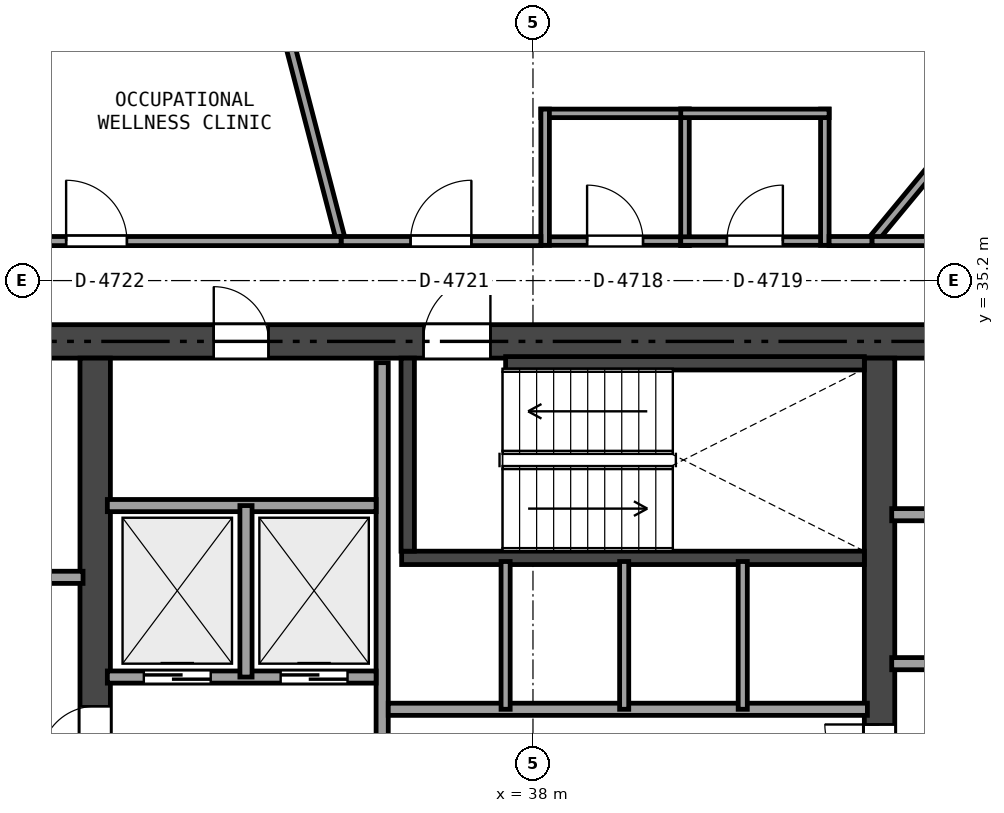
"""IFC4 building model, lengths in metres.
Left out: names, types, materials, properties, quantities, classifications, styles, units other than length and angle.
Written with IfcOpenShell. Run it as: python <this file> out.ifc"""

import sys

from ifc_helpers import new_model, si_unit, direction, frame, frame_2d, origin, place, context, subcontext, project, spatial, rectangle, extrude, element, fill, save


model = new_model("IFC4")
c1 = context("Model", 3, precision=1e-05, world=origin(), true_north=direction((0.0, 1.0)))
c2 = subcontext(c1, "Body", "Model", "MODEL_VIEW")
j1 = project(units=[si_unit("LENGTHUNIT", "METRE"), si_unit("PLANEANGLEUNIT", "RADIAN")], contexts=[c1])
p1 = place(None, origin())
s1 = spatial("IfcSite", under=j1, at=p1, CompositionType="ELEMENT")
p2 = place(p1, origin())
s2 = spatial("IfcBuilding", under=s1, at=p2, CompositionType="ELEMENT")
p3 = place(p2, frame((0.0, 0.0, 177.0)))
s3 = spatial("IfcBuildingStorey", under=s2, at=p3, CompositionType="ELEMENT", Elevation=177.0)
p4 = place(p3, frame((26.525, 34.2, 0.0), z_axis=(0.0, 0.0, 1.0), x_axis=(1.0, 0.0, 0.0)))
e1 = element("IfcWall", 1, at=p4, inside=s3, PredefinedType="SHEAR", context=c2, shape_type="SweptSolid", body=[
    extrude(rectangle(XDim=21.35, YDim=0.55, at=frame_2d((10.675, 0.0))), origin(), (0.0, 0.0, 1.0), 3.32),
])
p5 = place(p4, frame((9.675, 0.0, 0.0)))
e2 = element("IfcOpeningElement", 2, at=p5, cuts=e1, PredefinedType="OPENING", context=c2, shape_type="SweptSolid", body=[
    extrude(rectangle(XDim=1.1, YDim=2.15, at=frame_2d((0.55, 1.075))), frame((0.0, 0.285, 0.0), z_axis=(0.0, -1.0, 0.0), x_axis=(1.0, 0.0, 0.0)), (0.0, 0.0, 1.0), 0.57),
])
p6 = place(p4, frame((1.925, 0.0, 0.0)))
e3 = element("IfcOpeningElement", 3, at=p6, cuts=e1, PredefinedType="OPENING", context=c2, shape_type="SweptSolid", body=[
    extrude(rectangle(XDim=0.9, YDim=2.1, at=frame_2d((0.45, 1.05))), frame((0.0, 0.285, 0.0), z_axis=(0.0, -1.0, 0.0), x_axis=(1.0, 0.0, 0.0)), (0.0, 0.0, 1.0), 0.57),
])
p7 = place(p4, frame((6.225, 0.0, 0.0)))
e4 = element("IfcOpeningElement", 4, at=p7, cuts=e1, PredefinedType="OPENING", context=c2, shape_type="SweptSolid", body=[
    extrude(rectangle(XDim=0.9, YDim=2.1, at=frame_2d((0.45, 1.05))), frame((0.0, 0.285, 0.0), z_axis=(0.0, -1.0, 0.0), x_axis=(1.0, 0.0, 0.0)), (0.0, 0.0, 1.0), 0.57),
])
p8 = place(p3, frame((30.8, 18.875, 0.0), z_axis=(0.0, 0.0, 1.0), x_axis=(0.0, 1.0, 0.0)))
e5 = element("IfcWall", 5, at=p8, inside=s3, PredefinedType="SHEAR", context=c2, shape_type="SweptSolid", body=[
    extrude(rectangle(XDim=15.05, YDim=0.5, at=frame_2d((7.525, 0.0))), origin(), (0.0, 0.0, 1.0), 3.32),
])
p9 = place(p8, frame((6.625, 0.0, 0.0)))
e6 = element("IfcOpeningElement", 6, at=p9, cuts=e5, PredefinedType="OPENING", context=c2, shape_type="SweptSolid", body=[
    extrude(rectangle(XDim=1.1, YDim=2.15, at=frame_2d((0.55, 1.075))), frame((0.0, 0.26, 0.0), z_axis=(0.0, -1.0, 0.0), x_axis=(1.0, 0.0, 0.0)), (0.0, 0.0, 1.0), 0.52),
])
p10 = place(p8, frame((8.425, 0.0, 0.0)))
e7 = element("IfcOpeningElement", 7, at=p10, cuts=e5, PredefinedType="OPENING", context=c2, shape_type="SweptSolid", body=[
    extrude(rectangle(XDim=0.9, YDim=2.1, at=frame_2d((0.45, 1.05))), frame((0.0, 0.26, 0.0), z_axis=(0.0, -1.0, 0.0), x_axis=(1.0, 0.0, 0.0)), (0.0, 0.0, 1.0), 0.52),
])
p11 = place(p3, frame((43.7, 18.875, 0.0), z_axis=(0.0, 0.0, 1.0), x_axis=(0.0, 1.0, 0.0)))
e8 = element("IfcWall", 8, at=p11, inside=s3, PredefinedType="SHEAR", context=c2, shape_type="SweptSolid", body=[
    extrude(rectangle(XDim=15.05, YDim=0.5, at=frame_2d((7.525, 0.0))), origin(), (0.0, 0.0, 1.0), 3.32),
])
p12 = place(p11, frame((8.125, 0.0, 0.0)))
e9 = element("IfcOpeningElement", 9, at=p12, cuts=e8, PredefinedType="OPENING", context=c2, shape_type="SweptSolid", body=[
    extrude(rectangle(XDim=0.9, YDim=2.1, at=frame_2d((0.45, 1.05))), frame((0.0, 0.26, 0.0), z_axis=(0.0, -1.0, 0.0), x_axis=(1.0, 0.0, 0.0)), (0.0, 0.0, 1.0), 0.52),
])
p13 = place(p3, frame((35.84, 30.64, 0.0), z_axis=(0.0, 0.0, 1.0), x_axis=(1.0, 0.0, 0.0)))
e10 = element("IfcWall", 10, at=p13, inside=s3, PredefinedType="SHEAR", context=c2, shape_type="SweptSolid", body=[
    extrude(rectangle(XDim=7.61, YDim=0.22, at=frame_2d((3.805, 0.0))), origin(), (0.0, 0.0, 1.0), 3.32),
])
p14 = place(p3, frame((35.94, 30.75, 0.0), z_axis=(0.0, 0.0, 1.0), x_axis=(0.0, 1.0, 0.0)))
e11 = element("IfcWall", 11, at=p14, inside=s3, PredefinedType="SHEAR", context=c2, shape_type="SweptSolid", body=[
    extrude(rectangle(XDim=3.175, YDim=0.22, at=frame_2d((1.587, 0.0))), origin(), (0.0, 0.0, 1.0), 3.32),
])
p15 = place(p3, frame((37.55, 33.84, 0.0), z_axis=(0.0, 0.0, 1.0), x_axis=(1.0, 0.0, 0.0)))
e12 = element("IfcWall", 12, at=p15, inside=s3, PredefinedType="SHEAR", context=c2, shape_type="SweptSolid", body=[
    extrude(rectangle(XDim=5.9, YDim=0.22, at=frame_2d((2.95, 0.0))), origin(), (0.0, 0.0, 1.0), 3.32),
])
p16 = place(p3, frame((27.15, 30.32, 0.0), z_axis=(0.0, 0.0, 1.0), x_axis=(1.0, 0.0, 0.0)))
e13 = element("IfcWall", 13, at=p16, inside=s3, PredefinedType="SOLIDWALL", context=c2, shape_type="SweptSolid", body=[
    extrude(rectangle(XDim=3.45, YDim=0.2, at=frame_2d((1.725, 0.0))), origin(), (0.0, 0.0, 1.0), 3.32),
])
p17 = place(p3, frame((43.9, 28.9, 0.0), z_axis=(0.0, 0.0, 1.0), x_axis=(1.0, 0.0, 0.0)))
e14 = element("IfcWall", 14, at=p17, inside=s3, PredefinedType="SOLIDWALL", context=c2, shape_type="SweptSolid", body=[
    extrude(rectangle(XDim=3.35, YDim=0.2, at=frame_2d((1.675, 0.0))), origin(), (0.0, 0.0, 1.0), 3.32),
])
p18 = place(p17, frame((1.15, 0.0, 0.0)))
e15 = element("IfcOpeningElement", 15, at=p18, cuts=e14, PredefinedType="OPENING", context=c2, shape_type="SweptSolid", body=[
    extrude(rectangle(XDim=0.9, YDim=2.1, at=frame_2d((0.45, 1.05))), frame((0.0, 0.11, 0.0), z_axis=(0.0, -1.0, 0.0), x_axis=(1.0, 0.0, 0.0)), (0.0, 0.0, 1.0), 0.22),
])
p19 = place(p3, frame((43.9, 31.35, 0.0), z_axis=(0.0, 0.0, 1.0), x_axis=(1.0, 0.0, 0.0)))
e16 = element("IfcWall", 16, at=p19, inside=s3, PredefinedType="SOLIDWALL", context=c2, shape_type="SweptSolid", body=[
    extrude(rectangle(XDim=3.35, YDim=0.2, at=frame_2d((1.675, 0.0))), origin(), (0.0, 0.0, 1.0), 3.32),
])
p20 = place(p3, frame((35.52, 18.95, 0.0), z_axis=(0.0, 0.0, 1.0), x_axis=(0.0, 1.0, 0.0)))
e17 = element("IfcWall", 17, at=p20, inside=s3, PredefinedType="SOLIDWALL", context=c2, shape_type="SweptSolid", body=[
    extrude(rectangle(XDim=14.9, YDim=0.2, at=frame_2d((7.45, 0.0))), origin(), (0.0, 0.0, 1.0), 2.841),
])
p21 = place(p20, frame((7.755, 0.0, 0.0)))
e18 = element("IfcOpeningElement", 18, at=p21, cuts=e17, PredefinedType="OPENING", context=c2, shape_type="SweptSolid", body=[
    extrude(rectangle(XDim=0.95, YDim=2.15, at=frame_2d((0.475, 1.075))), frame((0.0, 0.11, 0.0), z_axis=(0.0, -1.0, 0.0), x_axis=(1.0, 0.0, 0.0)), (0.0, 0.0, 1.0), 0.22),
])
p22 = place(p20, frame((0.6, 0.0, 0.0)))
e19 = element("IfcOpeningElement", 19, at=p22, cuts=e17, PredefinedType="OPENING", context=c2, shape_type="SweptSolid", body=[
    extrude(rectangle(XDim=0.9, YDim=2.1, at=frame_2d((0.45, 1.05))), frame((0.0, 0.11, 0.0), z_axis=(0.0, -1.0, 0.0), x_axis=(1.0, 0.0, 0.0)), (0.0, 0.0, 1.0), 0.22),
])
p23 = place(p3, frame((31.0, 28.68, 0.0), z_axis=(0.0, 0.0, 1.0), x_axis=(1.0, 0.0, 0.0)))
e20 = element("IfcWall", 20, at=p23, inside=s3, PredefinedType="SOLIDWALL", context=c2, shape_type="SweptSolid", body=[
    extrude(rectangle(XDim=4.42, YDim=0.2, at=frame_2d((2.21, 0.0))), origin(), (0.0, 0.0, 1.0), 3.32),
])
p24 = place(p23, frame((0.6, 0.0, 0.0)))
e21 = element("IfcOpeningElement", 21, at=p24, cuts=e20, PredefinedType="OPENING", context=c2, shape_type="SweptSolid", body=[
    extrude(rectangle(XDim=1.1, YDim=2.15, at=frame_2d((0.55, 1.075))), frame((0.0, 0.11, 0.0), z_axis=(0.0, -1.0, 0.0), x_axis=(1.0, 0.0, 0.0)), (0.0, 0.0, 1.0), 0.22),
])
p25 = place(p23, frame((2.85, 0.0, 0.0)))
e22 = element("IfcOpeningElement", 22, at=p25, cuts=e20, PredefinedType="OPENING", context=c2, shape_type="SweptSolid", body=[
    extrude(rectangle(XDim=1.1, YDim=2.15, at=frame_2d((0.55, 1.075))), frame((0.0, 0.11, 0.0), z_axis=(0.0, -1.0, 0.0), x_axis=(1.0, 0.0, 0.0)), (0.0, 0.0, 1.0), 0.22),
])
p26 = place(p3, frame((31.0, 31.5, 0.0), z_axis=(0.0, 0.0, 1.0), x_axis=(1.0, 0.0, 0.0)))
e23 = element("IfcWall", 23, at=p26, inside=s3, PredefinedType="SOLIDWALL", context=c2, shape_type="SweptSolid", body=[
    extrude(rectangle(XDim=4.42, YDim=0.2, at=frame_2d((2.21, 0.0))), origin(), (0.0, 0.0, 1.0), 3.32),
])
p27 = place(p3, frame((33.28, 28.68, 0.0), z_axis=(0.0, 0.0, 1.0), x_axis=(0.0, 1.0, 0.0)))
e24 = element("IfcWall", 24, at=p27, inside=s3, PredefinedType="SOLIDWALL", context=c2, shape_type="SweptSolid", body=[
    extrude(rectangle(XDim=2.82, YDim=0.2, at=frame_2d((1.41, 0.0))), origin(), (0.0, 0.0, 1.0), 3.32),
])
p28 = place(p3, frame((35.62, 28.15, 0.0), z_axis=(0.0, 0.0, 1.0), x_axis=(1.0, 0.0, 0.0)))
e25 = element("IfcWall", 25, at=p28, inside=s3, PredefinedType="SOLIDWALL", context=c2, shape_type="SweptSolid", body=[
    extrude(rectangle(XDim=7.88, YDim=0.2, at=frame_2d((3.94, 0.0))), origin(), (0.0, 0.0, 1.0), 3.32),
])
for number, where, z_axis, x_axis in (
    (26, (37.55, 28.15, 0.0), (0.0, 0.0, 1.0), (0.0, 1.0, 0.0)),
    (27, (39.5, 28.15, 0.0), (0.0, 0.0, 1.0), (0.0, 1.0, 0.0)),
    (28, (41.45, 28.15, 0.0), (0.0, 0.0, 1.0), (0.0, 1.0, 0.0)),
):
    element("IfcWall", number, at=place(p3, frame(where, z_axis=z_axis, x_axis=x_axis)), inside=s3, PredefinedType="PARTITIONING", context=c2, shape_type="SweptSolid", body=[
        extrude(rectangle(XDim=2.43, YDim=0.15, at=frame_2d((1.215, 0.0))), origin(), (0.0, 0.0, 1.0), 3.32),
    ])
p29 = place(p3, frame((38.13, 35.85, 0.0), z_axis=(0.0, 0.0, 1.0), x_axis=(1.0, 0.0, 0.0)))
e29 = element("IfcWall", 29, at=p29, inside=s3, PredefinedType="PARTITIONING", context=c2, shape_type="SweptSolid", body=[
    extrude(rectangle(XDim=2.44, YDim=0.14, at=frame_2d((1.22, 0.0))), origin(), (0.0, 0.0, 1.0), 2.841),
])
p30 = place(p29, frame((0.76, 0.0, 0.0)))
e30 = element("IfcOpeningElement", 30, at=p30, cuts=e29, PredefinedType="OPENING", context=c2, shape_type="SweptSolid", body=[
    extrude(rectangle(XDim=0.92, YDim=2.1, at=frame_2d((0.46, 1.05))), frame((0.0, 0.08, 0.0), z_axis=(0.0, -1.0, 0.0), x_axis=(1.0, 0.0, 0.0)), (0.0, 0.0, 1.0), 0.16),
])
p31 = place(p3, frame((40.5, 35.78, 0.0), z_axis=(0.0, 0.0, 1.0), x_axis=(0.0, 1.0, 0.0)))
e31 = element("IfcWall", 31, at=p31, inside=s3, PredefinedType="PARTITIONING", context=c2, shape_type="SweptSolid", body=[
    extrude(rectangle(XDim=2.24, YDim=0.14, at=frame_2d((1.12, 0.0))), origin(), (0.0, 0.0, 1.0), 2.993),
])
p32 = place(p3, frame((40.57, 37.95, 0.0), z_axis=(0.0, 0.0, 1.0), x_axis=(-1.0, 0.0, 0.0)))
e32 = element("IfcWall", 32, at=p32, inside=s3, PredefinedType="PARTITIONING", context=c2, shape_type="SweptSolid", body=[
    extrude(rectangle(XDim=2.44, YDim=0.14, at=frame_2d((1.22, 0.0))), origin(), (0.0, 0.0, 1.0), 2.841),
])
p33 = place(p3, frame((38.2, 38.02, 0.0), z_axis=(0.0, 0.0, 1.0), x_axis=(0.0, -1.0, 0.0)))
e33 = element("IfcWall", 33, at=p33, inside=s3, PredefinedType="PARTITIONING", context=c2, shape_type="SweptSolid", body=[
    extrude(rectangle(XDim=2.24, YDim=0.14, at=frame_2d((1.12, 0.0))), origin(), (0.0, 0.0, 1.0), 2.993),
])
p34 = place(p3, frame((40.43, 35.85, 0.0), z_axis=(0.0, 0.0, 1.0), x_axis=(1.0, 0.0, 0.0)))
e34 = element("IfcWall", 34, at=p34, inside=s3, PredefinedType="PARTITIONING", context=c2, shape_type="SweptSolid", body=[
    extrude(rectangle(XDim=2.44, YDim=0.14, at=frame_2d((1.22, 0.0))), origin(), (0.0, 0.0, 1.0), 2.841),
])
p35 = place(p34, frame((0.76, 0.0, 0.0)))
e35 = element("IfcOpeningElement", 35, at=p35, cuts=e34, PredefinedType="OPENING", context=c2, shape_type="SweptSolid", body=[
    extrude(rectangle(XDim=0.92, YDim=2.1, at=frame_2d((0.46, 1.05))), frame((0.0, 0.08, 0.0), z_axis=(0.0, -1.0, 0.0), x_axis=(1.0, 0.0, 0.0)), (0.0, 0.0, 1.0), 0.16),
])
p36 = place(p3, frame((42.8, 35.78, 0.0), z_axis=(0.0, 0.0, 1.0), x_axis=(0.0, 1.0, 0.0)))
e36 = element("IfcWall", 36, at=p36, inside=s3, PredefinedType="PARTITIONING", context=c2, shape_type="SweptSolid", body=[
    extrude(rectangle(XDim=2.24, YDim=0.14, at=frame_2d((1.12, 0.0))), origin(), (0.0, 0.0, 1.0), 2.949),
])
p37 = place(p3, frame((42.87, 37.95, 0.0), z_axis=(0.0, 0.0, 1.0), x_axis=(-1.0, 0.0, 0.0)))
e37 = element("IfcWall", 37, at=p37, inside=s3, PredefinedType="PARTITIONING", context=c2, shape_type="SweptSolid", body=[
    extrude(rectangle(XDim=2.44, YDim=0.14, at=frame_2d((1.22, 0.0))), origin(), (0.0, 0.0, 1.0), 2.841),
])
p38 = place(p3, frame((50.607, 44.348, 0.0), z_axis=(0.0, 0.0, 1.0), x_axis=(-0.637583567769, -0.770381200518, 0.0)))
e38 = element("IfcWall", 38, at=p38, inside=s3, PredefinedType="PARTITIONING", context=c2, shape_type="SweptSolid", body=[
    extrude(rectangle(XDim=11.031, YDim=0.15, at=frame_2d((5.515, 0.0))), origin(), (0.0, 0.0, 1.0), 2.949),
])
p39 = place(p3, frame((43.574, 35.85, 0.0), z_axis=(0.0, 0.0, 1.0), x_axis=(1.0, 0.0, 0.0)))
e39 = element("IfcWall", 39, at=p39, inside=s3, PredefinedType="PARTITIONING", context=c2, shape_type="SweptSolid", body=[
    extrude(rectangle(XDim=4.026, YDim=0.15, at=frame_2d((2.013, 0.0))), origin(), (0.0, 0.0, 1.0), 2.697),
])
p40 = place(p3, frame((33.074, 42.648, 0.0), z_axis=(0.0, 0.0, 1.0), x_axis=(0.251977614861, -0.967733063199, 0.0)))
e40 = element("IfcWall", 40, at=p40, inside=s3, PredefinedType="PARTITIONING", context=c2, shape_type="SweptSolid", body=[
    extrude(rectangle(XDim=7.024, YDim=0.15, at=frame_2d((3.512, 0.0))), origin(), (0.0, 0.0, 1.0), 2.905),
])
p41 = place(p3, frame((34.844, 35.85, 0.0), z_axis=(0.0, 0.0, 1.0), x_axis=(1.0, 0.0, 0.0)))
e41 = element("IfcWall", 41, at=p41, inside=s3, PredefinedType="PARTITIONING", context=c2, shape_type="SweptSolid", body=[
    extrude(rectangle(XDim=3.286, YDim=0.15, at=frame_2d((1.643, 0.0))), origin(), (0.0, 0.0, 1.0), 2.697),
])
p42 = place(p41, frame((1.143, 0.0, 0.0)))
e42 = element("IfcOpeningElement", 42, at=p42, cuts=e41, PredefinedType="OPENING", context=c2, shape_type="SweptSolid", body=[
    extrude(rectangle(XDim=1.0, YDim=2.15, at=frame_2d((0.5, 1.075))), frame((0.0, 0.085, 0.0), z_axis=(0.0, -1.0, 0.0), x_axis=(1.0, 0.0, 0.0)), (0.0, 0.0, 1.0), 0.17),
])
p43 = place(p3, frame((42.87, 35.85, 0.0), z_axis=(0.0, 0.0, 1.0), x_axis=(1.0, 0.0, 0.0)))
e43 = element("IfcWall", 43, at=p43, inside=s3, PredefinedType="PARTITIONING", context=c2, shape_type="SweptSolid", body=[
    extrude(rectangle(XDim=0.704, YDim=0.15, at=frame_2d((0.352, 0.0))), origin(), (0.0, 0.0, 1.0), 3.32),
])
p44 = place(p3, frame((26.8, 35.85, 0.0), z_axis=(0.0, 0.0, 1.0), x_axis=(1.0, 0.0, 0.0)))
e44 = element("IfcWall", 44, at=p44, inside=s3, PredefinedType="PARTITIONING", context=c2, shape_type="SweptSolid", body=[
    extrude(rectangle(XDim=8.044, YDim=0.15, at=frame_2d((4.022, 0.0))), origin(), (0.0, 0.0, 1.0), 2.697),
])
p45 = place(p44, frame((3.522, 0.0, 0.0)))
e45 = element("IfcOpeningElement", 45, at=p45, cuts=e44, PredefinedType="OPENING", context=c2, shape_type="SweptSolid", body=[
    extrude(rectangle(XDim=1.0, YDim=2.15, at=frame_2d((0.5, 1.075))), frame((0.0, 0.085, 0.0), z_axis=(0.0, -1.0, 0.0), x_axis=(1.0, 0.0, 0.0)), (0.0, 0.0, 1.0), 0.17),
])
p46 = place(p5, origin())
e46 = element("IfcDoor", 46, at=p46, inside=s3, OperationType="SINGLE_SWING_RIGHT", PredefinedType="DOOR", context=c2, shape_type="SweptSolid", body=[
    extrude(rectangle(XDim=1.1, YDim=2.15, at=frame_2d((0.55, 1.075))), frame((0.0, 0.025, 0.0), z_axis=(0.0, -1.0, 0.0), x_axis=(1.0, 0.0, 0.0)), (0.0, 0.0, 1.0), 0.05),
])
fill(e2, e46)
p47 = place(p12, origin())
e47 = element("IfcDoor", 47, at=p47, inside=s3, OperationType="SINGLE_SWING_RIGHT", PredefinedType="DOOR", context=c2, shape_type="SweptSolid", body=[
    extrude(rectangle(XDim=0.9, YDim=2.1, at=frame_2d((0.45, 1.05))), frame((0.0, 0.025, 0.0), z_axis=(0.0, -1.0, 0.0), x_axis=(1.0, 0.0, 0.0)), (0.0, 0.0, 1.0), 0.05),
])
fill(e9, e47)
p48 = place(p10, origin())
e48 = element("IfcDoor", 48, at=p48, inside=s3, OperationType="SINGLE_SWING_LEFT", PredefinedType="DOOR", context=c2, shape_type="SweptSolid", body=[
    extrude(rectangle(XDim=0.9, YDim=2.1, at=frame_2d((0.45, 1.05))), frame((0.0, 0.025, 0.0), z_axis=(0.0, -1.0, 0.0), x_axis=(1.0, 0.0, 0.0)), (0.0, 0.0, 1.0), 0.05),
])
fill(e7, e48)
p49 = place(p7, origin())
e49 = element("IfcDoor", 49, at=p49, inside=s3, OperationType="SINGLE_SWING_LEFT", PredefinedType="DOOR", context=c2, shape_type="SweptSolid", body=[
    extrude(rectangle(XDim=0.9, YDim=2.1, at=frame_2d((0.45, 1.05))), frame((0.0, 0.025, 0.0), z_axis=(0.0, -1.0, 0.0), x_axis=(1.0, 0.0, 0.0)), (0.0, 0.0, 1.0), 0.05),
])
fill(e4, e49)
p50 = place(p24, origin())
e50 = element("IfcDoor", 50, at=p50, inside=s3, OperationType="SLIDING_TO_LEFT", PredefinedType="DOOR", context=c2, shape_type="SweptSolid", body=[
    extrude(rectangle(XDim=1.1, YDim=2.15, at=frame_2d((0.55, 1.075))), frame((0.0, 0.025, 0.0), z_axis=(0.0, -1.0, 0.0), x_axis=(1.0, 0.0, 0.0)), (0.0, 0.0, 1.0), 0.05),
])
fill(e21, e50)
p51 = place(p25, origin())
e51 = element("IfcDoor", 51, at=p51, inside=s3, OperationType="SLIDING_TO_LEFT", PredefinedType="DOOR", context=c2, shape_type="SweptSolid", body=[
    extrude(rectangle(XDim=1.1, YDim=2.15, at=frame_2d((0.55, 1.075))), frame((0.0, 0.025, 0.0), z_axis=(0.0, -1.0, 0.0), x_axis=(1.0, 0.0, 0.0)), (0.0, 0.0, 1.0), 0.05),
])
fill(e22, e51)
p52 = place(p30, origin())
e52 = element("IfcDoor", 52, at=p52, inside=s3, OperationType="SINGLE_SWING_LEFT", PredefinedType="DOOR", context=c2, shape_type="SweptSolid", body=[
    extrude(rectangle(XDim=0.92, YDim=2.1, at=frame_2d((0.46, 1.05))), frame((0.0, 0.025, 0.0), z_axis=(0.0, -1.0, 0.0), x_axis=(1.0, 0.0, 0.0)), (0.0, 0.0, 1.0), 0.05),
])
fill(e30, e52)
p53 = place(p35, origin())
e53 = element("IfcDoor", 53, at=p53, inside=s3, OperationType="SINGLE_SWING_RIGHT", PredefinedType="DOOR", context=c2, shape_type="SweptSolid", body=[
    extrude(rectangle(XDim=0.92, YDim=2.1, at=frame_2d((0.46, 1.05))), frame((0.0, 0.025, 0.0), z_axis=(0.0, -1.0, 0.0), x_axis=(1.0, 0.0, 0.0)), (0.0, 0.0, 1.0), 0.05),
])
fill(e35, e53)
p54 = place(p42, origin())
e54 = element("IfcDoor", 54, at=p54, inside=s3, OperationType="SINGLE_SWING_RIGHT", PredefinedType="DOOR", context=c2, shape_type="SweptSolid", body=[
    extrude(rectangle(XDim=1.0, YDim=2.15, at=frame_2d((0.5, 1.075))), frame((0.0, 0.025, 0.0), z_axis=(0.0, -1.0, 0.0), x_axis=(1.0, 0.0, 0.0)), (0.0, 0.0, 1.0), 0.05),
])
fill(e42, e54)
p55 = place(p45, origin())
e55 = element("IfcDoor", 55, at=p55, inside=s3, OperationType="SINGLE_SWING_LEFT", PredefinedType="DOOR", context=c2, shape_type="SweptSolid", body=[
    extrude(rectangle(XDim=1.0, YDim=2.15, at=frame_2d((0.5, 1.075))), frame((0.0, 0.025, 0.0), z_axis=(0.0, -1.0, 0.0), x_axis=(1.0, 0.0, 0.0)), (0.0, 0.0, 1.0), 0.05),
])
fill(e45, e55)
save(model, sys.argv[1])
